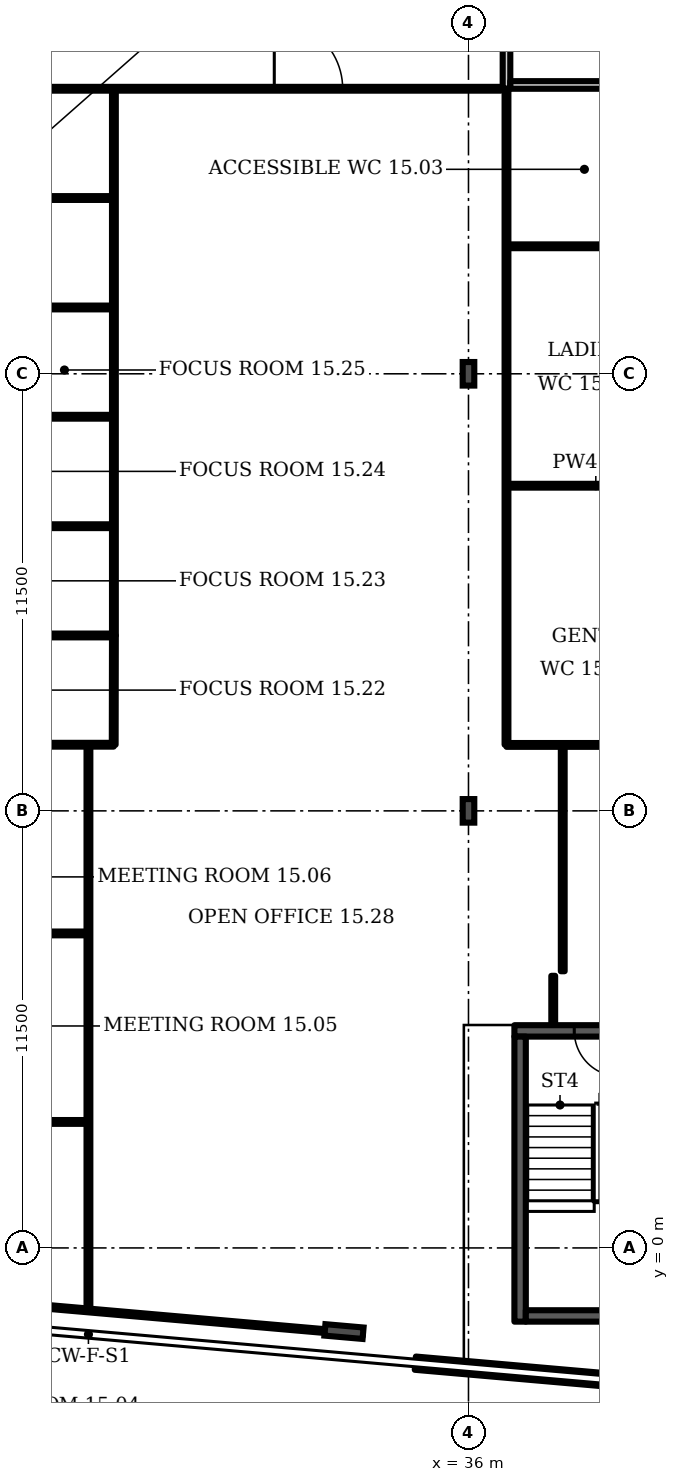
"""IFC4 building model, lengths in metres.
Left out: names, types, materials, properties, quantities, classifications, styles, units other than length and angle.
Written with IfcOpenShell. Run it as: python <this file> out.ifc"""

import sys

from ifc_helpers import new_model, si_unit, direction, frame, frame_2d, origin, origin_2d, place, context, subcontext, project, spatial, rectangle, i_section, extrude, element, fill, save


model = new_model("IFC4")
c1 = context("Model", 3, precision=1e-05, world=origin(), true_north=direction((0.0, 1.0)))
c2 = subcontext(c1, "Body", "Model", "MODEL_VIEW")
j1 = project(units=[si_unit("LENGTHUNIT", "METRE"), si_unit("PLANEANGLEUNIT", "RADIAN")], contexts=[c1])
p1 = place(None, origin())
s1 = spatial("IfcSite", under=j1, at=p1, CompositionType="ELEMENT")
p2 = place(p1, origin())
s2 = spatial("IfcBuilding", under=s1, at=p2, CompositionType="ELEMENT")
p3 = place(p2, frame((0.0, 0.0, 73.9)))
s3 = spatial("IfcBuildingStorey", under=s2, at=p3, CompositionType="ELEMENT", Elevation=73.9)
p4 = place(p3, frame((32.724, -2.2, 0.0), z_axis=(0.0, 0.0, 1.0), x_axis=(-0.087156, -0.996198, 0.0)))
e1 = element("IfcColumn", 1, at=p4, inside=s3, PredefinedType="COLUMN", context=c2, shape_type="SweptSolid", body=[
    extrude(i_section(OverallWidth=0.302, OverallDepth=1.008, WebThickness=0.021, FlangeThickness=0.04, FilletRadius=0.03, at=origin_2d()), origin(), (0.0, 0.0, 1.0), 3.6),
])
for number, where, z_axis, x_axis in (
    (2, (36.0, 11.5, 0.0), (0.0, 0.0, 1.0), (1.0, 0.0, 0.0)),
    (3, (36.0, 23.0, 0.0), (0.0, 0.0, 1.0), (1.0, 0.0, 0.0)),
):
    element("IfcColumn", number, at=place(p3, frame(where, z_axis=z_axis, x_axis=x_axis)), inside=s3, PredefinedType="COLUMN", context=c2, shape_type="SweptSolid", body=[
        extrude(i_section(OverallWidth=0.305, OverallDepth=0.62, WebThickness=0.021, FlangeThickness=0.04, FilletRadius=0.027, at=origin_2d()), origin(), (0.0, 0.0, 1.0), 3.6),
    ])
p5 = place(p3, frame((34.601, -3.032, 0.0), z_axis=(0.0, 0.0, 1.0), x_axis=(0.996193, -0.087148, 0.0)))
e4 = element("IfcWall", 4, at=p5, inside=s3, PredefinedType="SOLIDWALL", context=c2, shape_type="SweptSolid", body=[
    extrude(rectangle(XDim=11.458, YDim=0.35, at=frame_2d((5.729, 0.0))), origin(), (0.0, 0.0, 1.0), 1.0),
])
p6 = place(p3, frame((37.0, 30.5, 0.0), z_axis=(0.0, 0.0, 1.0), x_axis=(0.0, 1.0, 0.0)))
e5 = element("IfcWall", 5, at=p6, inside=s3, PredefinedType="PARTITIONING", context=c2, shape_type="SweptSolid", body=[
    extrude(rectangle(XDim=3.5, YDim=0.2, at=frame_2d((1.75, 0.0))), origin(), (0.0, 0.0, 1.0), 3.2),
])
p7 = place(p6, frame((1.2, 0.0, 0.0)))
e6 = element("IfcOpeningElement", 6, at=p7, cuts=e5, PredefinedType="OPENING", context=c2, shape_type="SweptSolid", body=[
    extrude(rectangle(XDim=1.1, YDim=2.1, at=frame_2d((0.55, 1.05))), frame((0.0, 0.11, 0.0), z_axis=(0.0, -1.0, 0.0), x_axis=(1.0, 0.0, 0.0)), (0.0, 0.0, 1.0), 0.22),
])
p8 = place(p3, frame((37.1, 30.6, 0.0), z_axis=(0.0, 0.0, 1.0), x_axis=(1.0, 0.0, 0.0)))
e7 = element("IfcWall", 7, at=p8, inside=s3, PredefinedType="PARTITIONING", context=c2, shape_type="SweptSolid", body=[
    extrude(rectangle(XDim=2.8, YDim=0.2, at=frame_2d((1.4, 0.0))), origin(), (0.0, 0.0, 1.0), 3.2),
])
p9 = place(p3, frame((37.208, 5.711, 0.0), z_axis=(0.0, 0.0, 1.0), x_axis=(1.0, 0.0, 0.0)))
e8 = element("IfcWall", 8, at=p9, inside=s3, PredefinedType="SHEAR", context=c2, shape_type="SweptSolid", body=[
    extrude(rectangle(XDim=4.35, YDim=0.3, at=frame_2d((2.175, 0.0))), origin(), (0.0, 0.0, 1.0), 3.2),
])
p10 = place(p9, frame((1.575, 0.0, 0.0)))
e9 = element("IfcOpeningElement", 9, at=p10, cuts=e8, PredefinedType="OPENING", context=c2, shape_type="SweptSolid", body=[
    extrude(rectangle(XDim=1.2, YDim=2.1, at=frame_2d((0.6, 1.05))), frame((0.0, 0.16, 0.0), z_axis=(0.0, -1.0, 0.0), x_axis=(1.0, 0.0, 0.0)), (0.0, 0.0, 1.0), 0.32),
])
for number, where, z_axis, x_axis in (
    (10, (21.94, 3.315, 0.0), (0.0, 0.0, 1.0), (1.0, 0.0, 0.0)),
    (11, (21.94, 8.275, 0.0), (0.0, 0.0, 1.0), (1.0, 0.0, 0.0)),
):
    element("IfcWall", number, at=place(p3, frame(where, z_axis=z_axis, x_axis=x_axis)), inside=s3, PredefinedType="PARTITIONING", context=c2, shape_type="SweptSolid", body=[
        extrude(rectangle(XDim=4.06, YDim=0.1, at=frame_2d((2.03, 0.0))), origin(), (0.0, 0.0, 1.0), 3.2),
    ])
for number, where, z_axis, x_axis in (
    (12, (21.94, 13.24, 0.0), (0.0, 0.0, 1.0), (1.0, 0.0, 0.0)),
    (13, (21.94, 16.115, 0.0), (0.0, 0.0, 1.0), (1.0, 0.0, 0.0)),
    (14, (21.94, 18.99, 0.0), (0.0, 0.0, 1.0), (1.0, 0.0, 0.0)),
    (15, (21.94, 21.87, 0.0), (0.0, 0.0, 1.0), (1.0, 0.0, 0.0)),
    (16, (21.94, 24.745, 0.0), (0.0, 0.0, 1.0), (1.0, 0.0, 0.0)),
    (17, (21.94, 27.625, 0.0), (0.0, 0.0, 1.0), (1.0, 0.0, 0.0)),
):
    element("IfcWall", number, at=place(p3, frame(where, z_axis=z_axis, x_axis=x_axis)), inside=s3, PredefinedType="PARTITIONING", context=c2, shape_type="SweptSolid", body=[
        extrude(rectangle(XDim=4.725, YDim=0.1, at=frame_2d((2.363, 0.0))), origin(), (0.0, 0.0, 1.0), 3.2),
    ])
p11 = place(p3, frame((21.94, 30.5, 0.0), z_axis=(0.0, 0.0, 1.0), x_axis=(1.0, 0.0, 0.0)))
e18 = element("IfcWall", 18, at=p11, inside=s3, PredefinedType="PARTITIONING", context=c2, shape_type="SweptSolid", body=[
    extrude(rectangle(XDim=14.91, YDim=0.1, at=frame_2d((7.455, 0.0))), origin(), (0.0, 0.0, 1.0), 3.2),
])
p12 = place(p11, frame((0.345, 0.0, 0.0)))
e19 = element("IfcOpeningElement", 19, at=p12, cuts=e18, PredefinedType="OPENING", context=c2, shape_type="SweptSolid", body=[
    extrude(rectangle(XDim=1.0, YDim=2.1, at=frame_2d((0.5, 1.05))), frame((0.0, 0.06, 0.0), z_axis=(0.0, -1.0, 0.0), x_axis=(1.0, 0.0, 0.0)), (0.0, 0.0, 1.0), 0.12),
])
p13 = place(p11, frame((8.95, 0.0, 0.0)))
e20 = element("IfcOpeningElement", 20, at=p13, cuts=e18, PredefinedType="OPENING", context=c2, shape_type="SweptSolid", body=[
    extrude(rectangle(XDim=1.8, YDim=2.1, at=frame_2d((0.9, 1.05))), frame((0.0, 0.06, 0.0), z_axis=(0.0, -1.0, 0.0), x_axis=(1.0, 0.0, 0.0)), (0.0, 0.0, 1.0), 0.12),
])
p14 = place(p3, frame((26.0, -1.645, 0.0), z_axis=(0.0, 0.0, 1.0), x_axis=(0.0, 1.0, 0.0)))
e21 = element("IfcWall", 21, at=p14, inside=s3, PredefinedType="PARTITIONING", context=c2, shape_type="SweptSolid", body=[
    extrude(rectangle(XDim=14.885, YDim=0.1, at=frame_2d((7.442, 0.0))), origin(), (0.0, 0.0, 1.0), 3.2),
])
p15 = place(p3, frame((26.665, 13.24, 0.0), z_axis=(0.0, 0.0, 1.0), x_axis=(0.001698, 0.999995, 0.0)))
e22 = element("IfcWall", 22, at=p15, inside=s3, PredefinedType="PARTITIONING", context=c2, shape_type="SweptSolid", body=[
    extrude(rectangle(XDim=2.875, YDim=0.1, at=frame_2d((1.438, 0.0))), origin(), (0.0, 0.0, 1.0), 3.2),
])
p16 = place(p3, frame((26.67, 16.115, 0.0), z_axis=(0.0, 0.0, 1.0), x_axis=(0.0, 1.0, 0.0)))
e23 = element("IfcWall", 23, at=p16, inside=s3, PredefinedType="PARTITIONING", context=c2, shape_type="SweptSolid", body=[
    extrude(rectangle(XDim=14.385, YDim=0.1, at=frame_2d((7.192, 0.0))), origin(), (0.0, 0.0, 1.0), 3.2),
])
p17 = place(p3, frame((33.22, -2.275, 0.0), z_axis=(0.0, 0.0, 1.0), x_axis=(-0.996212, 0.086913, 0.0)))
e24 = element("IfcWall", 24, at=p17, inside=s3, PredefinedType="PARTITIONING", context=c2, shape_type="SweptSolid", body=[
    extrude(rectangle(XDim=11.323, YDim=0.1, at=frame_2d((5.662, 0.0))), origin(), (0.0, 0.0, 1.0), 2.58),
])
p18 = place(p3, frame((37.0, 13.235, 0.0), z_axis=(0.0, 0.0, 1.0), x_axis=(1.0, 0.0, 0.0)))
e25 = element("IfcWall", 25, at=p18, inside=s3, PredefinedType="PARTITIONING", context=c2, shape_type="SweptSolid", body=[
    extrude(rectangle(XDim=6.49, YDim=0.1, at=frame_2d((3.245, 0.0))), origin(), (0.0, 0.0, 1.0), 3.2),
])
p19 = place(p3, frame((37.0, 13.24, 0.0), z_axis=(0.0, 0.0, 1.0), x_axis=(0.0, 1.0, 0.0)))
e26 = element("IfcWall", 26, at=p19, inside=s3, PredefinedType="PARTITIONING", context=c2, shape_type="SweptSolid", body=[
    extrude(rectangle(XDim=17.26, YDim=0.1, at=frame_2d((8.63, 0.0))), origin(), (0.0, 0.0, 1.0), 3.2),
])
for number, where, z_axis, x_axis in (
    (27, (37.0, 20.055, 0.0), (0.0, 0.0, 1.0), (1.0, 0.0, 0.0)),
    (28, (37.0, 26.355, 0.0), (0.0, 0.0, 1.0), (1.0, 0.0, 0.0)),
):
    element("IfcWall", number, at=place(p3, frame(where, z_axis=z_axis, x_axis=x_axis)), inside=s3, PredefinedType="PARTITIONING", context=c2, shape_type="SweptSolid", body=[
        extrude(rectangle(XDim=4.7, YDim=0.1, at=frame_2d((2.35, 0.0))), origin(), (0.0, 0.0, 1.0), 3.2),
    ])
p20 = place(p3, frame((38.23, 5.881, 0.0), z_axis=(0.0, 0.0, 1.0), x_axis=(0.0, 1.0, 0.0)))
e29 = element("IfcWall", 29, at=p20, inside=s3, PredefinedType="PARTITIONING", context=c2, shape_type="SweptSolid", body=[
    extrude(rectangle(XDim=1.279, YDim=0.1, at=frame_2d((0.64, 0.0))), origin(), (0.0, 0.0, 1.0), 3.2),
])
p21 = place(p3, frame((38.48, 7.28, 0.0), z_axis=(0.0, 0.0, 1.0), x_axis=(0.0, 1.0, 0.0)))
e30 = element("IfcWall", 30, at=p21, inside=s3, PredefinedType="PARTITIONING", context=c2, shape_type="SweptSolid", body=[
    extrude(rectangle(XDim=5.955, YDim=0.1, at=frame_2d((2.978, 0.0))), origin(), (0.0, 0.0, 1.0), 3.2),
])
p22 = place(p3, frame((37.358, -1.939, 0.0), z_axis=(0.0, 0.0, 1.0), x_axis=(0.0, 1.0, 0.0)))
e31 = element("IfcWall", 31, at=p22, inside=s3, PredefinedType="SHEAR", context=c2, shape_type="SweptSolid", body=[
    extrude(rectangle(XDim=7.5, YDim=0.3, at=frame_2d((3.75, 0.0))), origin(), (0.0, 0.0, 1.0), 3.2),
])
p23 = place(p3, frame((37.508, -1.789, 0.0), z_axis=(0.0, 0.0, 1.0), x_axis=(1.0, 0.0, 0.0)))
e32 = element("IfcWall", 32, at=p23, inside=s3, PredefinedType="SHEAR", context=c2, shape_type="SweptSolid", body=[
    extrude(rectangle(XDim=3.75, YDim=0.3, at=frame_2d((1.875, 0.0))), origin(), (0.0, 0.0, 1.0), 3.2),
])
p24 = place(p10, origin())
e33 = element("IfcDoor", 33, at=p24, inside=s3, OperationType="SINGLE_SWING_RIGHT", PredefinedType="DOOR", context=c2, shape_type="SweptSolid", body=[
    extrude(rectangle(XDim=1.2, YDim=2.1, at=frame_2d((0.6, 1.05))), frame((0.0, 0.025, 0.0), z_axis=(0.0, -1.0, 0.0), x_axis=(1.0, 0.0, 0.0)), (0.0, 0.0, 1.0), 0.05),
])
fill(e9, e33)
p25 = place(p13, origin())
e34 = element("IfcDoor", 34, at=p25, inside=s3, OperationType="DOUBLE_DOOR_SINGLE_SWING", PredefinedType="DOOR", context=c2, shape_type="SweptSolid", body=[
    extrude(rectangle(XDim=1.8, YDim=2.1, at=frame_2d((0.9, 1.05))), frame((0.0, 0.025, 0.0), z_axis=(0.0, -1.0, 0.0), x_axis=(1.0, 0.0, 0.0)), (0.0, 0.0, 1.0), 0.05),
])
fill(e20, e34)
save(model, sys.argv[1])
